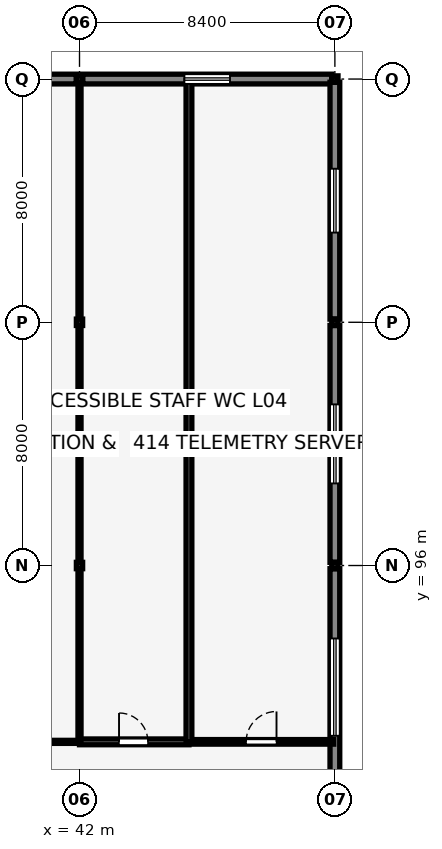
"""IFC4 building model, lengths in metres.
Left out: names, types, materials, properties, quantities, classifications, styles, units other than length and angle.
Written with IfcOpenShell. Run it as: python <this file> out.ifc"""

import sys

from ifc_helpers import new_model, si_unit, direction, frame, frame_2d, origin, origin_2d, place, context, subcontext, project, spatial, rectangle, i_section, extrude, element, fill, save


model = new_model("IFC4")
c1 = context("Model", 3, precision=1e-05, world=origin(), true_north=direction((0.0, 1.0)))
c2 = subcontext(c1, "Body", "Model", "MODEL_VIEW")
j1 = project(units=[si_unit("LENGTHUNIT", "METRE"), si_unit("PLANEANGLEUNIT", "RADIAN")], contexts=[c1])
p1 = place(None, origin())
s1 = spatial("IfcSite", under=j1, at=p1, CompositionType="ELEMENT")
p2 = place(p1, origin())
s2 = spatial("IfcBuilding", under=s1, at=p2, CompositionType="ELEMENT")
p3 = place(p2, frame((0.0, 0.0, 17.2)))
s3 = spatial("IfcBuildingStorey", under=s2, at=p3, CompositionType="ELEMENT", Elevation=17.2)
for number, where, z_axis, x_axis in (
    (1, (42.0, 96.0, 0.0), (0.0, 0.0, 1.0), (1.0, 0.0, 0.0)),
    (2, (42.0, 104.0, 0.0), (0.0, 0.0, 1.0), (1.0, 0.0, 0.0)),
    (3, (42.0, 112.0, 0.0), (0.0, 0.0, 1.0), (1.0, 0.0, 0.0)),
    (4, (50.4, 96.0, 0.0), (0.0, 0.0, 1.0), (1.0, 0.0, 0.0)),
    (5, (50.4, 104.0, 0.0), (0.0, 0.0, 1.0), (1.0, 0.0, 0.0)),
    (6, (50.4, 112.0, 0.0), (0.0, 0.0, 1.0), (1.0, 0.0, 0.0)),
):
    element("IfcColumn", number, at=place(p3, frame(where, z_axis=z_axis, x_axis=x_axis)), inside=s3, PredefinedType="COLUMN", context=c2, shape_type="SweptSolid", body=[
        extrude(i_section(OverallWidth=0.206, OverallDepth=0.21, WebThickness=0.01, FlangeThickness=0.014, FilletRadius=0.01, at=origin_2d()), origin(), (0.0, 0.0, 1.0), 3.59),
    ])
p4 = place(p3, frame((33.85, 112.0, 0.0), z_axis=(0.0, 0.0, 1.0), x_axis=(1.0, 0.0, 0.0)))
e7 = element("IfcWall", 7, at=p4, inside=s3, PredefinedType="SOLIDWALL", context=c2, shape_type="SweptSolid", body=[
    extrude(rectangle(XDim=8.047, YDim=0.32, at=frame_2d((4.023, 0.0))), origin(), (0.0, 0.0, 1.0), 3.33),
])
p5 = place(p4, frame((3.124, 0.0, 0.9), z_axis=(0.0, 0.0, 1.0), x_axis=(1.0, 0.0, 0.0)))
e8 = element("IfcOpeningElement", 8, at=p5, cuts=e7, PredefinedType="OPENING", context=c2, shape_type="SweptSolid", body=[
    extrude(rectangle(XDim=1.8, YDim=1.3, at=frame_2d((0.9, 0.65))), frame((0.0, 0.17, 0.0), z_axis=(0.0, -1.0, 0.0), x_axis=(1.0, 0.0, 0.0)), (0.0, 0.0, 1.0), 0.34),
])
p6 = place(p3, frame((42.103, 112.0, 0.0), z_axis=(0.0, 0.0, 1.0), x_axis=(1.0, 0.0, 0.0)))
e9 = element("IfcWall", 9, at=p6, inside=s3, PredefinedType="SOLIDWALL", context=c2, shape_type="SweptSolid", body=[
    extrude(rectangle(XDim=8.194, YDim=0.32, at=frame_2d((4.097, 0.0))), origin(), (0.0, 0.0, 1.0), 3.33),
])
p7 = place(p6, frame((3.347, 0.0, 0.9), z_axis=(0.0, 0.0, 1.0), x_axis=(1.0, 0.0, 0.0)))
e10 = element("IfcOpeningElement", 10, at=p7, cuts=e9, PredefinedType="OPENING", context=c2, shape_type="SweptSolid", body=[
    extrude(rectangle(XDim=1.5, YDim=1.4, at=frame_2d((0.75, 0.7))), frame((0.0, 0.17, 0.0), z_axis=(0.0, -1.0, 0.0), x_axis=(1.0, 0.0, 0.0)), (0.0, 0.0, 1.0), 0.34),
])
p8 = place(p3, frame((50.4, 88.105, 0.0), z_axis=(0.0, 0.0, 1.0), x_axis=(0.0, 1.0, 0.0)))
e11 = element("IfcWall", 11, at=p8, inside=s3, PredefinedType="SOLIDWALL", context=c2, shape_type="SweptSolid", body=[
    extrude(rectangle(XDim=7.791, YDim=0.32, at=frame_2d((3.895, 0.0))), origin(), (0.0, 0.0, 1.0), 3.29),
])
p9 = place(p8, frame((2.295, 0.0, 1.55), z_axis=(0.0, 0.0, 1.0), x_axis=(1.0, 0.0, 0.0)))
e12 = element("IfcOpeningElement", 12, at=p9, cuts=e11, PredefinedType="OPENING", context=c2, shape_type="SweptSolid", body=[
    extrude(rectangle(XDim=3.2, YDim=0.9, at=frame_2d((1.6, 0.45))), frame((0.0, 0.17, 0.0), z_axis=(0.0, -1.0, 0.0), x_axis=(1.0, 0.0, 0.0)), (0.0, 0.0, 1.0), 0.34),
])
p10 = place(p3, frame((50.4, 96.105, 0.0), z_axis=(0.0, 0.0, 1.0), x_axis=(0.0, 1.0, 0.0)))
e13 = element("IfcWall", 13, at=p10, inside=s3, PredefinedType="SOLIDWALL", context=c2, shape_type="SweptSolid", body=[
    extrude(rectangle(XDim=7.791, YDim=0.32, at=frame_2d((3.895, 0.0))), origin(), (0.0, 0.0, 1.0), 3.29),
])
p11 = place(p10, frame((2.595, 0.0, 1.55), z_axis=(0.0, 0.0, 1.0), x_axis=(1.0, 0.0, 0.0)))
e14 = element("IfcOpeningElement", 14, at=p11, cuts=e13, PredefinedType="OPENING", context=c2, shape_type="SweptSolid", body=[
    extrude(rectangle(XDim=2.6, YDim=0.85, at=frame_2d((1.3, 0.425))), frame((0.0, 0.17, 0.0), z_axis=(0.0, -1.0, 0.0), x_axis=(1.0, 0.0, 0.0)), (0.0, 0.0, 1.0), 0.34),
])
p12 = place(p3, frame((50.4, 104.105, 0.0), z_axis=(0.0, 0.0, 1.0), x_axis=(0.0, 1.0, 0.0)))
e15 = element("IfcWall", 15, at=p12, inside=s3, PredefinedType="SOLIDWALL", context=c2, shape_type="SweptSolid", body=[
    extrude(rectangle(XDim=7.791, YDim=0.32, at=frame_2d((3.895, 0.0))), origin(), (0.0, 0.0, 1.0), 3.29),
])
p13 = place(p12, frame((2.845, 0.0, 1.55), z_axis=(0.0, 0.0, 1.0), x_axis=(1.0, 0.0, 0.0)))
e16 = element("IfcOpeningElement", 16, at=p13, cuts=e15, PredefinedType="OPENING", context=c2, shape_type="SweptSolid", body=[
    extrude(rectangle(XDim=2.1, YDim=0.8, at=frame_2d((1.05, 0.4))), frame((0.0, 0.17, 0.0), z_axis=(0.0, -1.0, 0.0), x_axis=(1.0, 0.0, 0.0)), (0.0, 0.0, 1.0), 0.34),
])
p14 = place(p3, frame((33.6, 90.2, 0.0), z_axis=(0.0, 0.0, 1.0), x_axis=(1.0, 0.0, 0.0)))
e17 = element("IfcWall", 17, at=p14, inside=s3, PredefinedType="PARTITIONING", context=c2, shape_type="SweptSolid", body=[
    extrude(rectangle(XDim=8.4, YDim=0.1, at=frame_2d((4.2, 0.0))), origin(), (0.0, 0.0, 1.0), 3.59),
])
p15 = place(p14, frame((3.7, 0.0, 0.0), z_axis=(0.0, 0.0, 1.0), x_axis=(1.0, 0.0, 0.0)))
e18 = element("IfcOpeningElement", 18, at=p15, cuts=e17, PredefinedType="OPENING", context=c2, shape_type="SweptSolid", body=[
    extrude(rectangle(XDim=0.98, YDim=2.15, at=frame_2d((0.49, 1.075))), frame((0.0, 0.06, 0.0), z_axis=(0.0, -1.0, 0.0), x_axis=(1.0, 0.0, 0.0)), (0.0, 0.0, 1.0), 0.12),
])
p16 = place(p3, frame((42.0, 90.2, 0.0), z_axis=(0.0, 0.0, 1.0), x_axis=(1.0, 0.0, 0.0)))
e19 = element("IfcWall", 19, at=p16, inside=s3, PredefinedType="PLUMBINGWALL", context=c2, shape_type="SweptSolid", body=[
    extrude(rectangle(XDim=3.6, YDim=0.19, at=frame_2d((1.8, 0.0))), origin(), (0.0, 0.0, 1.0), 3.59),
])
p17 = place(p16, frame((1.3, 0.0, 0.0), z_axis=(0.0, 0.0, 1.0), x_axis=(1.0, 0.0, 0.0)))
e20 = element("IfcOpeningElement", 20, at=p17, cuts=e19, PredefinedType="OPENING", context=c2, shape_type="SweptSolid", body=[
    extrude(rectangle(XDim=0.95, YDim=2.15, at=frame_2d((0.475, 1.075))), frame((0.0, 0.105, 0.0), z_axis=(0.0, -1.0, 0.0), x_axis=(1.0, 0.0, 0.0)), (0.0, 0.0, 1.0), 0.21),
])
p18 = place(p3, frame((45.6, 90.2, 0.0), z_axis=(0.0, 0.0, 1.0), x_axis=(1.0, 0.0, 0.0)))
e21 = element("IfcWall", 21, at=p18, inside=s3, PredefinedType="PARTITIONING", context=c2, shape_type="SweptSolid", body=[
    extrude(rectangle(XDim=4.76, YDim=0.15, at=frame_2d((2.38, 0.0))), origin(), (0.0, 0.0, 1.0), 3.59),
])
p19 = place(p18, frame((1.88, 0.0, 0.0), z_axis=(0.0, 0.0, 1.0), x_axis=(1.0, 0.0, 0.0)))
e22 = element("IfcOpeningElement", 22, at=p19, cuts=e21, PredefinedType="OPENING", context=c2, shape_type="SweptSolid", body=[
    extrude(rectangle(XDim=1.0, YDim=2.15, at=frame_2d((0.5, 1.075))), frame((0.0, 0.085, 0.0), z_axis=(0.0, -1.0, 0.0), x_axis=(1.0, 0.0, 0.0)), (0.0, 0.0, 1.0), 0.17),
])
p20 = place(p3, frame((42.0, 90.2, 0.0), z_axis=(0.0, 0.0, 1.0), x_axis=(0.0, 1.0, 0.0)))
e23 = element("IfcWall", 23, at=p20, inside=s3, PredefinedType="PARTITIONING", context=c2, shape_type="SweptSolid", body=[
    extrude(rectangle(XDim=5.705, YDim=0.1, at=frame_2d((2.853, 0.0))), origin(), (0.0, 0.0, 1.0), 3.137),
])
for number, where, z_axis, x_axis in (
    (24, (42.0, 96.095, 0.0), (0.0, 0.0, 1.0), (0.0, 1.0, 0.0)),
    (25, (42.0, 104.095, 0.0), (0.0, 0.0, 1.0), (0.0, 1.0, 0.0)),
):
    element("IfcWall", number, at=place(p3, frame(where, z_axis=z_axis, x_axis=x_axis)), inside=s3, PredefinedType="PARTITIONING", context=c2, shape_type="SweptSolid", body=[
        extrude(rectangle(XDim=7.811, YDim=0.1, at=frame_2d((3.905, 0.0))), origin(), (0.0, 0.0, 1.0), 3.137),
    ])
p21 = place(p3, frame((45.6, 90.2, 0.0), z_axis=(0.0, 0.0, 1.0), x_axis=(0.0, 1.0, 0.0)))
e26 = element("IfcWall", 26, at=p21, inside=s3, PredefinedType="PLUMBINGWALL", context=c2, shape_type="SweptSolid", body=[
    extrude(rectangle(XDim=21.76, YDim=0.19, at=frame_2d((10.88, 0.0))), origin(), (0.0, 0.0, 1.0), 3.59),
])
p22 = place(p7, origin())
e27 = element("IfcWindow", 27, at=p22, inside=s3, PartitioningType="SINGLE_PANEL", PredefinedType="WINDOW", context=c2, shape_type="SweptSolid", body=[
    extrude(rectangle(XDim=1.5, YDim=1.4, at=frame_2d((0.75, 0.7))), frame((0.0, 0.03, 0.0), z_axis=(0.0, -1.0, 0.0), x_axis=(1.0, 0.0, 0.0)), (0.0, 0.0, 1.0), 0.06),
])
fill(e10, e27)
p23 = place(p9, origin())
e28 = element("IfcWindow", 28, at=p23, inside=s3, PartitioningType="TRIPLE_PANEL_HORIZONTAL", PredefinedType="WINDOW", context=c2, shape_type="SweptSolid", body=[
    extrude(rectangle(XDim=3.2, YDim=0.9, at=frame_2d((1.6, 0.45))), frame((0.0, 0.03, 0.0), z_axis=(0.0, -1.0, 0.0), x_axis=(1.0, 0.0, 0.0)), (0.0, 0.0, 1.0), 0.06),
])
fill(e12, e28)
p24 = place(p11, origin())
e29 = element("IfcWindow", 29, at=p24, inside=s3, PartitioningType="DOUBLE_PANEL_HORIZONTAL", PredefinedType="WINDOW", context=c2, shape_type="SweptSolid", body=[
    extrude(rectangle(XDim=2.6, YDim=0.85, at=frame_2d((1.3, 0.425))), frame((0.0, 0.03, 0.0), z_axis=(0.0, -1.0, 0.0), x_axis=(1.0, 0.0, 0.0)), (0.0, 0.0, 1.0), 0.06),
])
fill(e14, e29)
p25 = place(p13, origin())
e30 = element("IfcWindow", 30, at=p25, inside=s3, PartitioningType="DOUBLE_PANEL_HORIZONTAL", PredefinedType="WINDOW", context=c2, shape_type="SweptSolid", body=[
    extrude(rectangle(XDim=2.1, YDim=0.8, at=frame_2d((1.05, 0.4))), frame((0.0, 0.03, 0.0), z_axis=(0.0, -1.0, 0.0), x_axis=(1.0, 0.0, 0.0)), (0.0, 0.0, 1.0), 0.06),
])
fill(e16, e30)
p26 = place(p17, origin())
e31 = element("IfcDoor", 31, at=p26, inside=s3, OperationType="SINGLE_SWING_LEFT", PredefinedType="DOOR", context=c2, shape_type="SweptSolid", body=[
    extrude(rectangle(XDim=0.95, YDim=2.15, at=frame_2d((0.475, 1.075))), frame((0.0, 0.025, 0.0), z_axis=(0.0, -1.0, 0.0), x_axis=(1.0, 0.0, 0.0)), (0.0, 0.0, 1.0), 0.05),
])
fill(e20, e31)
p27 = place(p19, origin())
e32 = element("IfcDoor", 32, at=p27, inside=s3, OperationType="SINGLE_SWING_RIGHT", PredefinedType="DOOR", context=c2, shape_type="SweptSolid", body=[
    extrude(rectangle(XDim=1.0, YDim=2.15, at=frame_2d((0.5, 1.075))), frame((0.0, 0.025, 0.0), z_axis=(0.0, -1.0, 0.0), x_axis=(1.0, 0.0, 0.0)), (0.0, 0.0, 1.0), 0.05),
])
fill(e22, e32)
save(model, sys.argv[1])
